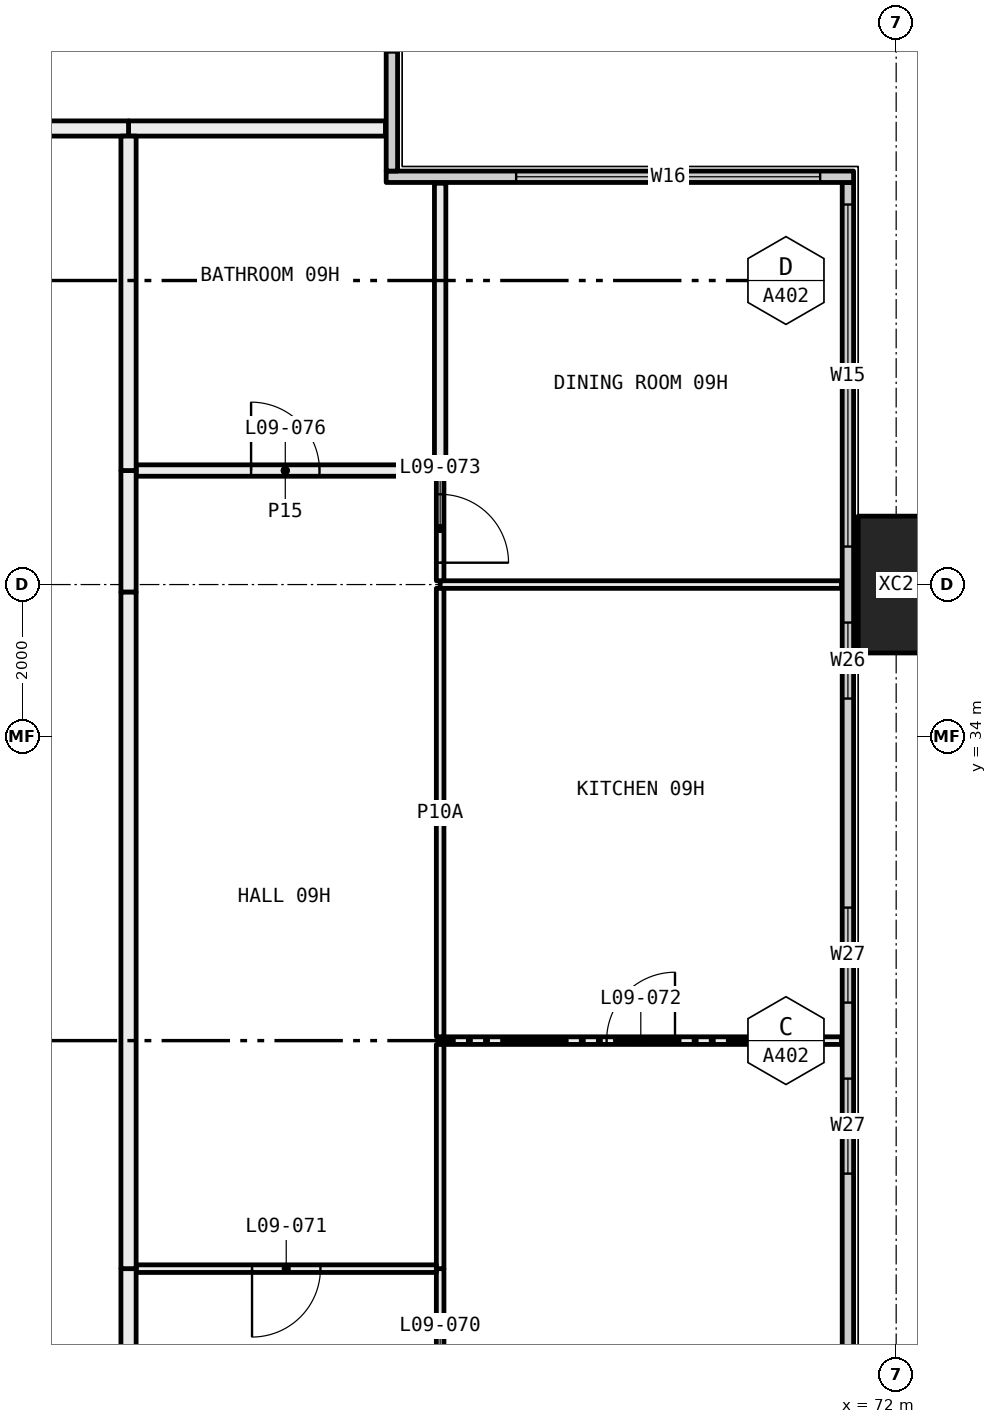
"""IFC4 building model, lengths in metres.
Left out: names, types, materials, properties, quantities, classifications, styles, units other than length and angle.
Written with IfcOpenShell. Run it as: python <this file> out.ifc"""

import sys

from ifc_helpers import new_model, si_unit, direction, frame, frame_2d, origin, origin_2d, place, context, subcontext, project, spatial, rectangle, hollow_rectangle, extrude, element, fill, save


model = new_model("IFC4")
c1 = context("Model", 3, precision=1e-05, world=origin(), true_north=direction((0.0, 1.0)))
c2 = subcontext(c1, "Body", "Model", "MODEL_VIEW")
j1 = project(units=[si_unit("LENGTHUNIT", "METRE"), si_unit("PLANEANGLEUNIT", "RADIAN")], contexts=[c1])
p1 = place(None, origin())
s1 = spatial("IfcSite", under=j1, at=p1, CompositionType="ELEMENT")
p2 = place(p1, origin())
s2 = spatial("IfcBuilding", under=s1, at=p2, CompositionType="ELEMENT")
p3 = place(p2, frame((0.0, 0.0, 43.8)))
s3 = spatial("IfcBuildingStorey", under=s2, at=p3, CompositionType="ELEMENT", Elevation=43.8)
p4 = place(p3, frame((72.0, 36.0, -0.4), z_axis=(0.0, 0.0, 1.0), x_axis=(0.0, 1.0, 0.0)))
e1 = element("IfcColumn", 1, at=p4, inside=s3, PredefinedType="COLUMN", context=c2, shape_type="SweptSolid", body=[
    extrude(hollow_rectangle(XDim=1.8, YDim=1.0, WallThickness=0.07, at=origin_2d()), origin(), (0.0, 0.0, 1.0), 3.45),
])
p5 = place(p3, frame((71.365, 6.71, 0.0), z_axis=(0.0, 0.0, 1.0), x_axis=(0.0, 1.0, 0.0)))
e2 = element("IfcWall", 2, at=p5, inside=s3, PredefinedType="ELEMENTEDWALL", context=c2, shape_type="SweptSolid", body=[
    extrude(rectangle(XDim=34.58, YDim=0.15, at=frame_2d((17.29, 0.0))), origin(), (0.0, 0.0, 1.0), 3.05),
])
p6 = place(p5, frame((0.29, 0.0, 0.45)))
e3 = element("IfcOpeningElement", 3, at=p6, cuts=e2, PredefinedType="OPENING", context=c2, shape_type="SweptSolid", body=[
    extrude(rectangle(XDim=4.5, YDim=2.55, at=frame_2d((2.25, 1.275))), frame((0.0, 0.085, 0.0), z_axis=(0.0, -1.0, 0.0), x_axis=(1.0, 0.0, 0.0)), (0.0, 0.0, 1.0), 0.17),
])
p7 = place(p5, frame((5.79, 0.0, 0.45)))
e4 = element("IfcOpeningElement", 4, at=p7, cuts=e2, PredefinedType="OPENING", context=c2, shape_type="SweptSolid", body=[
    extrude(rectangle(XDim=1.0, YDim=2.55, at=frame_2d((0.5, 1.275))), frame((0.0, 0.085, 0.0), z_axis=(0.0, -1.0, 0.0), x_axis=(1.0, 0.0, 0.0)), (0.0, 0.0, 1.0), 0.17),
])
p8 = place(p5, frame((9.54, 0.0, 0.45)))
e5 = element("IfcOpeningElement", 5, at=p8, cuts=e2, PredefinedType="OPENING", context=c2, shape_type="SweptSolid", body=[
    extrude(rectangle(XDim=1.25, YDim=2.55, at=frame_2d((0.625, 1.275))), frame((0.0, 0.085, 0.0), z_axis=(0.0, -1.0, 0.0), x_axis=(1.0, 0.0, 0.0)), (0.0, 0.0, 1.0), 0.17),
])
p9 = place(p5, frame((11.79, 0.0, 0.45)))
e6 = element("IfcOpeningElement", 6, at=p9, cuts=e2, PredefinedType="OPENING", context=c2, shape_type="SweptSolid", body=[
    extrude(rectangle(XDim=1.25, YDim=2.55, at=frame_2d((0.625, 1.275))), frame((0.0, 0.085, 0.0), z_axis=(0.0, -1.0, 0.0), x_axis=(1.0, 0.0, 0.0)), (0.0, 0.0, 1.0), 0.17),
])
p10 = place(p5, frame((15.79, 0.0, 0.45)))
e7 = element("IfcOpeningElement", 7, at=p10, cuts=e2, PredefinedType="OPENING", context=c2, shape_type="SweptSolid", body=[
    extrude(rectangle(XDim=1.0, YDim=2.55, at=frame_2d((0.5, 1.275))), frame((0.0, 0.085, 0.0), z_axis=(0.0, -1.0, 0.0), x_axis=(1.0, 0.0, 0.0)), (0.0, 0.0, 1.0), 0.17),
])
p11 = place(p5, frame((17.79, 0.0, 0.45)))
e8 = element("IfcOpeningElement", 8, at=p11, cuts=e2, PredefinedType="OPENING", context=c2, shape_type="SweptSolid", body=[
    extrude(rectangle(XDim=1.0, YDim=2.55, at=frame_2d((0.5, 1.275))), frame((0.0, 0.085, 0.0), z_axis=(0.0, -1.0, 0.0), x_axis=(1.0, 0.0, 0.0)), (0.0, 0.0, 1.0), 0.17),
])
p12 = place(p5, frame((21.54, 0.0, 0.45)))
e9 = element("IfcOpeningElement", 9, at=p12, cuts=e2, PredefinedType="OPENING", context=c2, shape_type="SweptSolid", body=[
    extrude(rectangle(XDim=1.25, YDim=2.55, at=frame_2d((0.625, 1.275))), frame((0.0, 0.085, 0.0), z_axis=(0.0, -1.0, 0.0), x_axis=(1.0, 0.0, 0.0)), (0.0, 0.0, 1.0), 0.17),
])
p13 = place(p5, frame((23.79, 0.0, 0.45)))
e10 = element("IfcOpeningElement", 10, at=p13, cuts=e2, PredefinedType="OPENING", context=c2, shape_type="SweptSolid", body=[
    extrude(rectangle(XDim=1.25, YDim=2.55, at=frame_2d((0.625, 1.275))), frame((0.0, 0.085, 0.0), z_axis=(0.0, -1.0, 0.0), x_axis=(1.0, 0.0, 0.0)), (0.0, 0.0, 1.0), 0.17),
])
p14 = place(p5, frame((27.79, 0.0, 0.45)))
e11 = element("IfcOpeningElement", 11, at=p14, cuts=e2, PredefinedType="OPENING", context=c2, shape_type="SweptSolid", body=[
    extrude(rectangle(XDim=1.0, YDim=2.55, at=frame_2d((0.5, 1.275))), frame((0.0, 0.085, 0.0), z_axis=(0.0, -1.0, 0.0), x_axis=(1.0, 0.0, 0.0)), (0.0, 0.0, 1.0), 0.17),
])
p15 = place(p5, frame((29.79, 0.0, 0.45)))
e12 = element("IfcOpeningElement", 12, at=p15, cuts=e2, PredefinedType="OPENING", context=c2, shape_type="SweptSolid", body=[
    extrude(rectangle(XDim=4.5, YDim=2.55, at=frame_2d((2.25, 1.275))), frame((0.0, 0.085, 0.0), z_axis=(0.0, -1.0, 0.0), x_axis=(1.0, 0.0, 0.0)), (0.0, 0.0, 1.0), 0.17),
])
p16 = place(p3, frame((65.29, 41.365, 0.0), z_axis=(0.0, 0.0, 1.0), x_axis=(1.0, 0.0, 0.0)))
e13 = element("IfcWall", 13, at=p16, inside=s3, PredefinedType="ELEMENTEDWALL", context=c2, shape_type="SweptSolid", body=[
    extrude(rectangle(XDim=6.15, YDim=0.15, at=frame_2d((3.075, 0.0))), origin(), (0.0, 0.0, 1.0), 3.05),
])
p17 = place(p16, frame((1.71, 0.0, 0.45)))
e14 = element("IfcOpeningElement", 14, at=p17, cuts=e13, PredefinedType="OPENING", context=c2, shape_type="SweptSolid", body=[
    extrude(rectangle(XDim=4.0, YDim=2.55, at=frame_2d((2.0, 1.275))), frame((0.0, 0.085, 0.0), z_axis=(0.0, -1.0, 0.0), x_axis=(1.0, 0.0, 0.0)), (0.0, 0.0, 1.0), 0.17),
])
p18 = place(p3, frame((65.365, 41.44, 0.0), z_axis=(0.0, 0.0, 1.0), x_axis=(0.0, 1.0, 0.0)))
e15 = element("IfcWall", 15, at=p18, inside=s3, PredefinedType="ELEMENTEDWALL", context=c2, shape_type="SweptSolid", body=[
    extrude(rectangle(XDim=5.85, YDim=0.15, at=frame_2d((2.925, 0.0))), origin(), (0.0, 0.0, 1.0), 3.05),
])
p19 = place(p18, frame((1.56, 0.0, 0.45)))
e16 = element("IfcOpeningElement", 16, at=p19, cuts=e15, PredefinedType="OPENING", context=c2, shape_type="SweptSolid", body=[
    extrude(rectangle(XDim=4.0, YDim=2.55, at=frame_2d((2.0, 1.275))), frame((0.0, 0.085, 0.0), z_axis=(0.0, -1.0, 0.0), x_axis=(1.0, 0.0, 0.0)), (0.0, 0.0, 1.0), 0.17),
])
p20 = place(p3, frame((61.9, 42.0, 0.0), z_axis=(0.0, 0.0, 1.0), x_axis=(1.0, 0.0, 0.0)))
e17 = element("IfcWall", 17, at=p20, inside=s3, PredefinedType="PARTITIONING", context=c2, shape_type="SweptSolid", body=[
    extrude(rectangle(XDim=3.38, YDim=0.2, at=frame_2d((1.69, 0.0))), origin(), (0.0, 0.0, 1.0), 3.05),
])
p21 = place(p3, frame((60.0, 42.0, 0.0), z_axis=(0.0, 0.0, 1.0), x_axis=(1.0, 0.0, 0.0)))
e18 = element("IfcWall", 18, at=p21, inside=s3, PredefinedType="PARTITIONING", context=c2, shape_type="SweptSolid", body=[
    extrude(rectangle(XDim=1.9, YDim=0.2, at=frame_2d((0.95, 0.0))), origin(), (0.0, 0.0, 1.0), 3.05),
])
p22 = place(p3, frame((71.28, 30.0, 0.0), z_axis=(0.0, 0.0, 1.0), x_axis=(-1.0, 0.0, 0.0)))
e19 = element("IfcWall", 19, at=p22, inside=s3, PredefinedType="PARTITIONING", context=c2, shape_type="SweptSolid", body=[
    extrude(rectangle(XDim=5.28, YDim=0.1, at=frame_2d((2.64, 0.0))), origin(), (0.0, 0.0, 1.0), 3.05),
])
p23 = place(p22, frame((2.19, 0.0, 0.0)))
e20 = element("IfcOpeningElement", 20, at=p23, cuts=e19, PredefinedType="OPENING", context=c2, shape_type="SweptSolid", body=[
    extrude(rectangle(XDim=0.9, YDim=2.1, at=frame_2d((0.45, 1.05))), frame((0.0, 0.06, 0.0), z_axis=(0.0, -1.0, 0.0), x_axis=(1.0, 0.0, 0.0)), (0.0, 0.0, 1.0), 0.12),
])
p24 = place(p3, frame((66.0, 27.0, 0.0), z_axis=(0.0, 0.0, 1.0), x_axis=(0.0, -1.0, 0.0)))
e21 = element("IfcWall", 21, at=p24, inside=s3, PredefinedType="PARTITIONING", context=c2, shape_type="SweptSolid", body=[
    extrude(rectangle(XDim=3.1, YDim=0.1, at=frame_2d((1.55, 0.0))), origin(), (0.0, 0.0, 1.0), 2.45),
])
p25 = place(p24, frame((1.1, 0.0, 0.0)))
e22 = element("IfcOpeningElement", 22, at=p25, cuts=e21, PredefinedType="OPENING", context=c2, shape_type="SweptSolid", body=[
    extrude(rectangle(XDim=0.9, YDim=2.1, at=frame_2d((0.45, 1.05))), frame((0.0, 0.06, 0.0), z_axis=(0.0, -1.0, 0.0), x_axis=(1.0, 0.0, 0.0)), (0.0, 0.0, 1.0), 0.12),
])
p26 = place(p3, frame((66.0, 29.95, 0.0), z_axis=(0.0, 0.0, 1.0), x_axis=(0.0, -1.0, 0.0)))
e23 = element("IfcWall", 23, at=p26, inside=s3, PredefinedType="PARTITIONING", context=c2, shape_type="SweptSolid", body=[
    extrude(rectangle(XDim=2.95, YDim=0.1, at=frame_2d((1.475, 0.0))), origin(), (0.0, 0.0, 1.0), 3.05),
])
p27 = place(p3, frame((71.28, 36.0, 0.0), z_axis=(0.0, 0.0, 1.0), x_axis=(-1.0, 0.0, 0.0)))
e24 = element("IfcWall", 24, at=p27, inside=s3, PredefinedType="PARTITIONING", context=c2, shape_type="SweptSolid", body=[
    extrude(rectangle(XDim=5.28, YDim=0.1, at=frame_2d((2.64, 0.0))), origin(), (0.0, 0.0, 1.0), 2.45),
])
p28 = place(p3, frame((66.0, 35.95, 0.0), z_axis=(0.0, 0.0, 1.0), x_axis=(0.0, -1.0, 0.0)))
e25 = element("IfcWall", 25, at=p28, inside=s3, PredefinedType="PARTITIONING", context=c2, shape_type="SweptSolid", body=[
    extrude(rectangle(XDim=5.9, YDim=0.1, at=frame_2d((2.95, 0.0))), origin(), (0.0, 0.0, 1.0), 2.45),
])
p29 = place(p3, frame((66.0, 37.425, 0.0), z_axis=(0.0, 0.0, 1.0), x_axis=(0.0, -1.0, 0.0)))
e26 = element("IfcWall", 26, at=p29, inside=s3, PredefinedType="PARTITIONING", context=c2, shape_type="SweptSolid", body=[
    extrude(rectangle(XDim=1.375, YDim=0.1, at=frame_2d((0.688, 0.0))), origin(), (0.0, 0.0, 1.0), 2.45),
])
p30 = place(p29, frame((0.238, 0.0, 0.0)))
e27 = element("IfcOpeningElement", 27, at=p30, cuts=e26, PredefinedType="OPENING", context=c2, shape_type="SweptSolid", body=[
    extrude(rectangle(XDim=0.9, YDim=2.1, at=frame_2d((0.45, 1.05))), frame((0.0, 0.06, 0.0), z_axis=(0.0, -1.0, 0.0), x_axis=(1.0, 0.0, 0.0)), (0.0, 0.0, 1.0), 0.12),
])
p31 = place(p3, frame((66.0, 41.28, 0.0), z_axis=(0.0, 0.0, 1.0), x_axis=(0.0, -1.0, 0.0)))
e28 = element("IfcWall", 28, at=p31, inside=s3, PredefinedType="PARTITIONING", context=c2, shape_type="SweptSolid", body=[
    extrude(rectangle(XDim=3.78, YDim=0.15, at=frame_2d((1.89, 0.0))), origin(), (0.0, 0.0, 1.0), 3.05),
])
p32 = place(p3, frame((65.95, 27.0, 0.0), z_axis=(0.0, 0.0, 1.0), x_axis=(-1.0, 0.0, 0.0)))
e29 = element("IfcWall", 29, at=p32, inside=s3, PredefinedType="PARTITIONING", context=c2, shape_type="SweptSolid", body=[
    extrude(rectangle(XDim=3.95, YDim=0.1, at=frame_2d((1.975, 0.0))), origin(), (0.0, 0.0, 1.0), 3.05),
])
p33 = place(p32, frame((1.525, 0.0, 0.0)))
e30 = element("IfcOpeningElement", 30, at=p33, cuts=e29, PredefinedType="OPENING", context=c2, shape_type="SweptSolid", body=[
    extrude(rectangle(XDim=0.9, YDim=2.1, at=frame_2d((0.45, 1.05))), frame((0.0, 0.06, 0.0), z_axis=(0.0, -1.0, 0.0), x_axis=(1.0, 0.0, 0.0)), (0.0, 0.0, 1.0), 0.12),
])
p34 = place(p3, frame((61.9, 27.0, 0.0), z_axis=(0.0, 0.0, 1.0), x_axis=(0.0, -1.0, 0.0)))
e31 = element("IfcWall", 31, at=p34, inside=s3, PredefinedType="PARTITIONING", context=c2, shape_type="SweptSolid", body=[
    extrude(rectangle(XDim=3.1, YDim=0.2, at=frame_2d((1.55, 0.0))), origin(), (0.0, 0.0, 1.0), 2.45),
])
p35 = place(p34, frame((1.05, 0.0, 0.0)))
e32 = element("IfcOpeningElement", 32, at=p35, cuts=e31, PredefinedType="OPENING", context=c2, shape_type="SweptSolid", body=[
    extrude(rectangle(XDim=1.0, YDim=2.1, at=frame_2d((0.5, 1.05))), frame((0.0, 0.11, 0.0), z_axis=(0.0, -1.0, 0.0), x_axis=(1.0, 0.0, 0.0)), (0.0, 0.0, 1.0), 0.22),
])
p36 = place(p3, frame((65.925, 37.5, 0.0), z_axis=(0.0, 0.0, 1.0), x_axis=(-1.0, 0.0, 0.0)))
e33 = element("IfcWall", 33, at=p36, inside=s3, PredefinedType="PARTITIONING", context=c2, shape_type="SweptSolid", body=[
    extrude(rectangle(XDim=3.925, YDim=0.15, at=frame_2d((1.962, 0.0))), origin(), (0.0, 0.0, 1.0), 3.05),
])
p37 = place(p36, frame((1.512, 0.0, 0.0)))
e34 = element("IfcOpeningElement", 34, at=p37, cuts=e33, PredefinedType="OPENING", context=c2, shape_type="SweptSolid", body=[
    extrude(rectangle(XDim=0.9, YDim=2.1, at=frame_2d((0.45, 1.05))), frame((0.0, 0.085, 0.0), z_axis=(0.0, -1.0, 0.0), x_axis=(1.0, 0.0, 0.0)), (0.0, 0.0, 1.0), 0.17),
])
p38 = place(p3, frame((61.9, 37.5, 0.0), z_axis=(0.0, 0.0, 1.0), x_axis=(0.0, -1.0, 0.0)))
e35 = element("IfcWall", 35, at=p38, inside=s3, PredefinedType="PARTITIONING", context=c2, shape_type="SweptSolid", body=[
    extrude(rectangle(XDim=1.6, YDim=0.2, at=frame_2d((0.8, 0.0))), origin(), (0.0, 0.0, 1.0), 2.45),
])
p39 = place(p3, frame((61.9, 35.9, 0.0), z_axis=(0.0, 0.0, 1.0), x_axis=(0.0, -1.0, 0.0)))
e36 = element("IfcWall", 36, at=p39, inside=s3, PredefinedType="PARTITIONING", context=c2, shape_type="SweptSolid", body=[
    extrude(rectangle(XDim=8.9, YDim=0.2, at=frame_2d((4.45, 0.0))), origin(), (0.0, 0.0, 1.0), 3.05),
])
p40 = place(p3, frame((61.9, 41.9, 0.0), z_axis=(0.0, 0.0, 1.0), x_axis=(0.0, -1.0, 0.0)))
e37 = element("IfcWall", 37, at=p40, inside=s3, PredefinedType="PARTITIONING", context=c2, shape_type="SweptSolid", body=[
    extrude(rectangle(XDim=4.4, YDim=0.2, at=frame_2d((2.2, 0.0))), origin(), (0.0, 0.0, 1.0), 3.05),
])
p41 = place(p12, origin())
e38 = element("IfcWindow", 38, at=p41, inside=s3, PartitioningType="SINGLE_PANEL", PredefinedType="WINDOW", context=c2, shape_type="SweptSolid", body=[
    extrude(rectangle(XDim=1.25, YDim=2.55, at=frame_2d((0.625, 1.275))), frame((0.0, 0.03, 0.0), z_axis=(0.0, -1.0, 0.0), x_axis=(1.0, 0.0, 0.0)), (0.0, 0.0, 1.0), 0.06),
])
fill(e9, e38)
p42 = place(p13, origin())
e39 = element("IfcWindow", 39, at=p42, inside=s3, PartitioningType="SINGLE_PANEL", PredefinedType="WINDOW", context=c2, shape_type="SweptSolid", body=[
    extrude(rectangle(XDim=1.25, YDim=2.55, at=frame_2d((0.625, 1.275))), frame((0.0, 0.03, 0.0), z_axis=(0.0, -1.0, 0.0), x_axis=(1.0, 0.0, 0.0)), (0.0, 0.0, 1.0), 0.06),
])
fill(e10, e39)
p43 = place(p14, origin())
e40 = element("IfcWindow", 40, at=p43, inside=s3, PartitioningType="SINGLE_PANEL", PredefinedType="WINDOW", context=c2, shape_type="SweptSolid", body=[
    extrude(rectangle(XDim=1.0, YDim=2.55, at=frame_2d((0.5, 1.275))), frame((0.0, 0.03, 0.0), z_axis=(0.0, -1.0, 0.0), x_axis=(1.0, 0.0, 0.0)), (0.0, 0.0, 1.0), 0.06),
])
fill(e11, e40)
p44 = place(p15, origin())
e41 = element("IfcWindow", 41, at=p44, inside=s3, PartitioningType="SINGLE_PANEL", PredefinedType="WINDOW", context=c2, shape_type="SweptSolid", body=[
    extrude(rectangle(XDim=4.5, YDim=2.55, at=frame_2d((2.25, 1.275))), frame((0.0, 0.03, 0.0), z_axis=(0.0, -1.0, 0.0), x_axis=(1.0, 0.0, 0.0)), (0.0, 0.0, 1.0), 0.06),
])
fill(e12, e41)
p45 = place(p17, origin())
e42 = element("IfcWindow", 42, at=p45, inside=s3, PartitioningType="SINGLE_PANEL", PredefinedType="WINDOW", context=c2, shape_type="SweptSolid", body=[
    extrude(rectangle(XDim=4.0, YDim=2.55, at=frame_2d((2.0, 1.275))), frame((0.0, 0.03, 0.0), z_axis=(0.0, -1.0, 0.0), x_axis=(1.0, 0.0, 0.0)), (0.0, 0.0, 1.0), 0.06),
])
fill(e14, e42)
p46 = place(p33, origin())
e43 = element("IfcDoor", 43, at=p46, inside=s3, OperationType="SINGLE_SWING_LEFT", PredefinedType="DOOR", context=c2, shape_type="SweptSolid", body=[
    extrude(rectangle(XDim=0.9, YDim=2.1, at=frame_2d((0.45, 1.05))), frame((0.0, 0.025, 0.0), z_axis=(0.0, -1.0, 0.0), x_axis=(1.0, 0.0, 0.0)), (0.0, 0.0, 1.0), 0.05),
])
fill(e30, e43)
p47 = place(p23, frame((0.9, 0.0, 0.0), x_axis=(-1.0, 0.0, 0.0)))
e44 = element("IfcDoor", 44, at=p47, inside=s3, OperationType="SINGLE_SWING_LEFT", PredefinedType="DOOR", context=c2, shape_type="SweptSolid", body=[
    extrude(rectangle(XDim=0.9, YDim=2.1, at=frame_2d((0.45, 1.05))), frame((0.0, 0.025, 0.0), z_axis=(0.0, -1.0, 0.0), x_axis=(1.0, 0.0, 0.0)), (0.0, 0.0, 1.0), 0.05),
])
fill(e20, e44)
p48 = place(p30, origin())
e45 = element("IfcDoor", 45, at=p48, inside=s3, OperationType="SINGLE_SWING_LEFT", PredefinedType="DOOR", context=c2, shape_type="SweptSolid", body=[
    extrude(rectangle(XDim=0.9, YDim=2.1, at=frame_2d((0.45, 1.05))), frame((0.0, 0.025, 0.0), z_axis=(0.0, -1.0, 0.0), x_axis=(1.0, 0.0, 0.0)), (0.0, 0.0, 1.0), 0.05),
])
fill(e27, e45)
p49 = place(p37, frame((0.9, 0.0, 0.0), x_axis=(-1.0, 0.0, 0.0)))
e46 = element("IfcDoor", 46, at=p49, inside=s3, OperationType="SINGLE_SWING_RIGHT", PredefinedType="DOOR", context=c2, shape_type="SweptSolid", body=[
    extrude(rectangle(XDim=0.9, YDim=2.1, at=frame_2d((0.45, 1.05))), frame((0.0, 0.025, 0.0), z_axis=(0.0, -1.0, 0.0), x_axis=(1.0, 0.0, 0.0)), (0.0, 0.0, 1.0), 0.05),
])
fill(e34, e46)
save(model, sys.argv[1])
